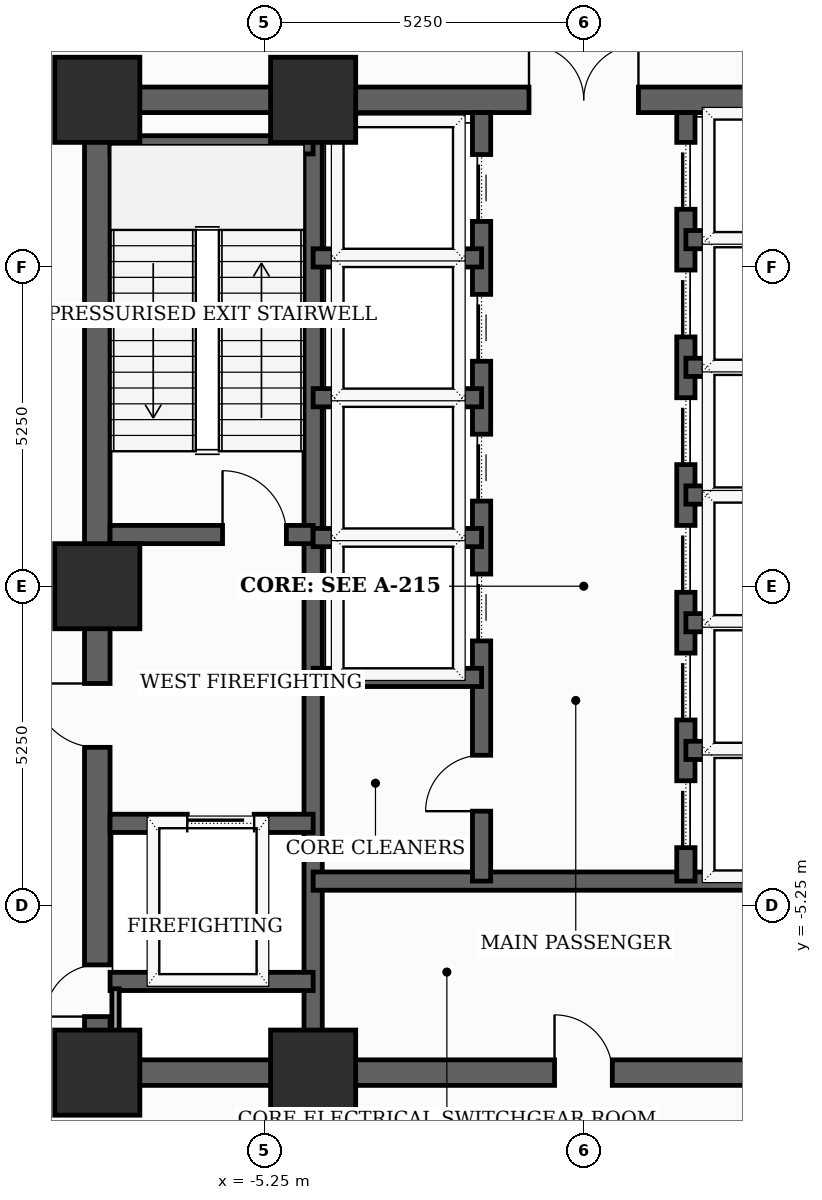
"""IFC4 building model, lengths in metres.
Left out: names, types, materials, properties, quantities, classifications, styles, units other than length and angle.
Written with IfcOpenShell. Run it as: python <this file> out.ifc"""

import sys

from ifc_helpers import new_model, si_unit, direction, frame, frame_2d, origin, origin_2d, place, context, subcontext, project, spatial, rectangle, extrude, element, fill, save


model = new_model("IFC4")
c1 = context("Model", 3, precision=1e-05, world=origin(), true_north=direction((0.0, 1.0)))
c2 = subcontext(c1, "Body", "Model", "MODEL_VIEW")
j1 = project(units=[si_unit("LENGTHUNIT", "METRE"), si_unit("PLANEANGLEUNIT", "RADIAN")], contexts=[c1])
p1 = place(None, origin())
s1 = spatial("IfcSite", under=j1, at=p1, CompositionType="ELEMENT")
p2 = place(p1, origin())
s2 = spatial("IfcBuilding", under=s1, at=p2, CompositionType="ELEMENT")
p3 = place(p2, frame((0.0, 0.0, 85.2)))
s3 = spatial("IfcBuildingStorey", under=s2, at=p3, CompositionType="ELEMENT", Elevation=85.2)
for number, where, z_axis, x_axis in (
    (1, (-8.0, -8.0, 0.0), (0.0, 0.0, 1.0), (1.0, 0.0, 0.0)),
    (2, (-4.45, -8.0, 0.0), (0.0, 0.0, 1.0), (1.0, 0.0, 0.0)),
    (3, (-4.45, 8.0, 0.0), (0.0, 0.0, 1.0), (1.0, 0.0, 0.0)),
    (4, (-8.0, 8.0, 0.0), (0.0, 0.0, 1.0), (1.0, 0.0, 0.0)),
    (5, (-8.0, 0.0, 0.0), (0.0, 0.0, 1.0), (1.0, 0.0, 0.0)),
):
    element("IfcColumn", number, at=place(p3, frame(where, z_axis=z_axis, x_axis=x_axis)), inside=s3, PredefinedType="COLUMN", context=c2, shape_type="SweptSolid", body=[
        extrude(rectangle(XDim=1.4, YDim=1.4, at=origin_2d()), origin(), (0.0, 0.0, 1.0), 5.1),
    ])
p4 = place(p3, frame((30.436, -3.14, 0.0), z_axis=(0.0, 0.0, 1.0), x_axis=(-0.743144101168, 0.669131410785, 0.0)))
e6 = element("IfcWall", 6, at=p4, inside=s3, PredefinedType="SOLIDWALL", context=c2, shape_type="SweptSolid", body=[
    extrude(rectangle(XDim=49.44, YDim=0.22, at=frame_2d((24.72, 0.0))), origin(), (0.0, 0.0, 1.0), 4.4),
])
p5 = place(p3, frame((-8.0, -8.0, 0.0), z_axis=(0.0, 0.0, 1.0), x_axis=(0.0, 1.0, 0.0)))
e7 = element("IfcWall", 7, at=p5, inside=s3, PredefinedType="SHEAR", context=c2, shape_type="SweptSolid", body=[
    extrude(rectangle(XDim=16.0, YDim=0.42, at=frame_2d((8.0, 0.0))), origin(), (0.0, 0.0, 1.0), 4.9),
])
p6 = place(p5, frame((0.922, 0.0, 0.0)))
e8 = element("IfcOpeningElement", 8, at=p6, cuts=e7, PredefinedType="OPENING", context=c2, shape_type="SweptSolid", body=[
    extrude(rectangle(XDim=0.85, YDim=2.02, at=frame_2d((0.425, 1.01))), frame((0.0, 0.22, 0.0), z_axis=(0.0, -1.0, 0.0), x_axis=(1.0, 0.0, 0.0)), (0.0, 0.0, 1.0), 0.44),
])
p7 = place(p5, frame((5.35, 0.0, 0.0)))
e9 = element("IfcOpeningElement", 9, at=p7, cuts=e7, PredefinedType="OPENING", context=c2, shape_type="SweptSolid", body=[
    extrude(rectangle(XDim=1.05, YDim=2.15, at=frame_2d((0.525, 1.075))), frame((0.0, 0.22, 0.0), z_axis=(0.0, -1.0, 0.0), x_axis=(1.0, 0.0, 0.0)), (0.0, 0.0, 1.0), 0.44),
])
p8 = place(p3, frame((-8.0, -8.0, 0.0), z_axis=(0.0, 0.0, 1.0), x_axis=(1.0, 0.0, 0.0)))
e10 = element("IfcWall", 10, at=p8, inside=s3, PredefinedType="SHEAR", context=c2, shape_type="SweptSolid", body=[
    extrude(rectangle(XDim=16.0, YDim=0.42, at=frame_2d((8.0, 0.0))), origin(), (0.0, 0.0, 1.0), 4.9),
])
p9 = place(p8, frame((7.52, 0.0, 0.0)))
e11 = element("IfcOpeningElement", 11, at=p9, cuts=e10, PredefinedType="OPENING", context=c2, shape_type="SweptSolid", body=[
    extrude(rectangle(XDim=0.95, YDim=2.1, at=frame_2d((0.475, 1.05))), frame((0.0, 0.22, 0.0), z_axis=(0.0, -1.0, 0.0), x_axis=(1.0, 0.0, 0.0)), (0.0, 0.0, 1.0), 0.44),
])
p10 = place(p3, frame((-8.0, 8.0, 0.0), z_axis=(0.0, 0.0, 1.0), x_axis=(1.0, 0.0, 0.0)))
e12 = element("IfcWall", 12, at=p10, inside=s3, PredefinedType="SHEAR", context=c2, shape_type="SweptSolid", body=[
    extrude(rectangle(XDim=16.0, YDim=0.42, at=frame_2d((8.0, 0.0))), origin(), (0.0, 0.0, 1.0), 4.9),
])
p11 = place(p10, frame((7.1, 0.0, 0.0)))
e13 = element("IfcOpeningElement", 13, at=p11, cuts=e12, PredefinedType="OPENING", context=c2, shape_type="SweptSolid", body=[
    extrude(rectangle(XDim=1.8, YDim=2.15, at=frame_2d((0.9, 1.075))), frame((0.0, 0.22, 0.0), z_axis=(0.0, -1.0, 0.0), x_axis=(1.0, 0.0, 0.0)), (0.0, 0.0, 1.0), 0.44),
])
p12 = place(p3, frame((-4.45, -7.79, 0.0), z_axis=(0.0, 0.0, 1.0), x_axis=(0.0, 1.0, 0.0)))
e14 = element("IfcWall", 14, at=p12, inside=s3, PredefinedType="SHEAR", context=c2, shape_type="SweptSolid", body=[
    extrude(rectangle(XDim=15.58, YDim=0.3, at=frame_2d((7.79, 0.0))), origin(), (0.0, 0.0, 1.0), 4.9),
])
p13 = place(p3, frame((-7.79, 0.85, 0.0), z_axis=(0.0, 0.0, 1.0), x_axis=(1.0, 0.0, 0.0)))
e15 = element("IfcWall", 15, at=p13, inside=s3, PredefinedType="SHEAR", context=c2, shape_type="SweptSolid", body=[
    extrude(rectangle(XDim=3.34, YDim=0.3, at=frame_2d((1.67, 0.0))), origin(), (0.0, 0.0, 1.0), 4.9),
])
p14 = place(p13, frame((1.85, 0.0, 0.0)))
e16 = element("IfcOpeningElement", 16, at=p14, cuts=e15, PredefinedType="OPENING", context=c2, shape_type="SweptSolid", body=[
    extrude(rectangle(XDim=1.05, YDim=2.15, at=frame_2d((0.525, 1.075))), frame((0.0, 0.16, 0.0), z_axis=(0.0, -1.0, 0.0), x_axis=(1.0, 0.0, 0.0)), (0.0, 0.0, 1.0), 0.32),
])
p15 = place(p3, frame((-7.79, 7.26, 0.0), z_axis=(0.0, 0.0, 1.0), x_axis=(1.0, 0.0, 0.0)))
e17 = element("IfcWall", 17, at=p15, inside=s3, PredefinedType="SHEAR", context=c2, shape_type="SweptSolid", body=[
    extrude(rectangle(XDim=3.34, YDim=0.3, at=frame_2d((1.67, 0.0))), origin(), (0.0, 0.0, 1.0), 4.9),
])
p16 = place(p3, frame((-7.79, -3.9, 0.0), z_axis=(0.0, 0.0, 1.0), x_axis=(1.0, 0.0, 0.0)))
e18 = element("IfcWall", 18, at=p16, inside=s3, PredefinedType="SHEAR", context=c2, shape_type="SweptSolid", body=[
    extrude(rectangle(XDim=3.34, YDim=0.3, at=frame_2d((1.67, 0.0))), origin(), (0.0, 0.0, 1.0), 4.9),
])
p17 = place(p16, frame((1.27, 0.0, 0.0)))
e19 = element("IfcOpeningElement", 19, at=p17, cuts=e18, PredefinedType="OPENING", context=c2, shape_type="SweptSolid", body=[
    extrude(rectangle(XDim=1.1, YDim=2.1, at=frame_2d((0.55, 1.05))), frame((0.0, 0.16, 0.0), z_axis=(0.0, -1.0, 0.0), x_axis=(1.0, 0.0, 0.0)), (0.0, 0.0, 1.0), 0.32),
])
p18 = place(p3, frame((-7.79, -6.5, 0.0), z_axis=(0.0, 0.0, 1.0), x_axis=(1.0, 0.0, 0.0)))
e20 = element("IfcWall", 20, at=p18, inside=s3, PredefinedType="SHEAR", context=c2, shape_type="SweptSolid", body=[
    extrude(rectangle(XDim=3.34, YDim=0.3, at=frame_2d((1.67, 0.0))), origin(), (0.0, 0.0, 1.0), 4.9),
])
p19 = place(p3, frame((-4.45, -4.85, 0.0), z_axis=(0.0, 0.0, 1.0), x_axis=(1.0, 0.0, 0.0)))
e21 = element("IfcWall", 21, at=p19, inside=s3, PredefinedType="SHEAR", context=c2, shape_type="SweptSolid", body=[
    extrude(rectangle(XDim=8.9, YDim=0.3, at=frame_2d((4.45, 0.0))), origin(), (0.0, 0.0, 1.0), 4.9),
])
p20 = place(p3, frame((-1.68, -4.85, 0.0), z_axis=(0.0, 0.0, 1.0), x_axis=(0.0, 1.0, 0.0)))
e22 = element("IfcWall", 22, at=p20, inside=s3, PredefinedType="SHEAR", context=c2, shape_type="SweptSolid", body=[
    extrude(rectangle(XDim=12.64, YDim=0.3, at=frame_2d((6.32, 0.0))), origin(), (0.0, 0.0, 1.0), 4.9),
])
p21 = place(p20, frame((3.95, 0.0, 0.0)))
e23 = element("IfcOpeningElement", 23, at=p21, cuts=e22, PredefinedType="OPENING", context=c2, shape_type="SweptSolid", body=[
    extrude(rectangle(XDim=1.1, YDim=2.1, at=frame_2d((0.55, 1.05))), frame((0.0, 0.16, 0.0), z_axis=(0.0, -1.0, 0.0), x_axis=(1.0, 0.0, 0.0)), (0.0, 0.0, 1.0), 0.32),
])
p22 = place(p20, frame((6.25, 0.0, 0.0)))
e24 = element("IfcOpeningElement", 24, at=p22, cuts=e22, PredefinedType="OPENING", context=c2, shape_type="SweptSolid", body=[
    extrude(rectangle(XDim=1.1, YDim=2.1, at=frame_2d((0.55, 1.05))), frame((0.0, 0.16, 0.0), z_axis=(0.0, -1.0, 0.0), x_axis=(1.0, 0.0, 0.0)), (0.0, 0.0, 1.0), 0.32),
])
p23 = place(p20, frame((8.55, 0.0, 0.0)))
e25 = element("IfcOpeningElement", 25, at=p23, cuts=e22, PredefinedType="OPENING", context=c2, shape_type="SweptSolid", body=[
    extrude(rectangle(XDim=1.1, YDim=2.1, at=frame_2d((0.55, 1.05))), frame((0.0, 0.16, 0.0), z_axis=(0.0, -1.0, 0.0), x_axis=(1.0, 0.0, 0.0)), (0.0, 0.0, 1.0), 0.32),
])
p24 = place(p20, frame((10.85, 0.0, 0.0)))
e26 = element("IfcOpeningElement", 26, at=p24, cuts=e22, PredefinedType="OPENING", context=c2, shape_type="SweptSolid", body=[
    extrude(rectangle(XDim=1.1, YDim=2.1, at=frame_2d((0.55, 1.05))), frame((0.0, 0.16, 0.0), z_axis=(0.0, -1.0, 0.0), x_axis=(1.0, 0.0, 0.0)), (0.0, 0.0, 1.0), 0.32),
])
p25 = place(p20, frame((1.15, 0.0, 0.0)))
e27 = element("IfcOpeningElement", 27, at=p25, cuts=e22, PredefinedType="OPENING", context=c2, shape_type="SweptSolid", body=[
    extrude(rectangle(XDim=0.92, YDim=2.1, at=frame_2d((0.46, 1.05))), frame((0.0, 0.16, 0.0), z_axis=(0.0, -1.0, 0.0), x_axis=(1.0, 0.0, 0.0)), (0.0, 0.0, 1.0), 0.32),
])
p26 = place(p3, frame((1.68, -4.85, 0.0), z_axis=(0.0, 0.0, 1.0), x_axis=(0.0, 1.0, 0.0)))
e28 = element("IfcWall", 28, at=p26, inside=s3, PredefinedType="SHEAR", context=c2, shape_type="SweptSolid", body=[
    extrude(rectangle(XDim=12.64, YDim=0.3, at=frame_2d((6.32, 0.0))), origin(), (0.0, 0.0, 1.0), 4.9),
])
p27 = place(p26, frame((0.55, 0.0, 0.0)))
e29 = element("IfcOpeningElement", 29, at=p27, cuts=e28, PredefinedType="OPENING", context=c2, shape_type="SweptSolid", body=[
    extrude(rectangle(XDim=1.1, YDim=2.1, at=frame_2d((0.55, 1.05))), frame((0.0, 0.16, 0.0), z_axis=(0.0, -1.0, 0.0), x_axis=(1.0, 0.0, 0.0)), (0.0, 0.0, 1.0), 0.32),
])
p28 = place(p26, frame((2.65, 0.0, 0.0)))
e30 = element("IfcOpeningElement", 30, at=p28, cuts=e28, PredefinedType="OPENING", context=c2, shape_type="SweptSolid", body=[
    extrude(rectangle(XDim=1.1, YDim=2.1, at=frame_2d((0.55, 1.05))), frame((0.0, 0.16, 0.0), z_axis=(0.0, -1.0, 0.0), x_axis=(1.0, 0.0, 0.0)), (0.0, 0.0, 1.0), 0.32),
])
p29 = place(p26, frame((4.75, 0.0, 0.0)))
e31 = element("IfcOpeningElement", 31, at=p29, cuts=e28, PredefinedType="OPENING", context=c2, shape_type="SweptSolid", body=[
    extrude(rectangle(XDim=1.1, YDim=2.1, at=frame_2d((0.55, 1.05))), frame((0.0, 0.16, 0.0), z_axis=(0.0, -1.0, 0.0), x_axis=(1.0, 0.0, 0.0)), (0.0, 0.0, 1.0), 0.32),
])
p30 = place(p26, frame((6.85, 0.0, 0.0)))
e32 = element("IfcOpeningElement", 32, at=p30, cuts=e28, PredefinedType="OPENING", context=c2, shape_type="SweptSolid", body=[
    extrude(rectangle(XDim=1.1, YDim=2.1, at=frame_2d((0.55, 1.05))), frame((0.0, 0.16, 0.0), z_axis=(0.0, -1.0, 0.0), x_axis=(1.0, 0.0, 0.0)), (0.0, 0.0, 1.0), 0.32),
])
p31 = place(p26, frame((8.95, 0.0, 0.0)))
e33 = element("IfcOpeningElement", 33, at=p31, cuts=e28, PredefinedType="OPENING", context=c2, shape_type="SweptSolid", body=[
    extrude(rectangle(XDim=1.1, YDim=2.1, at=frame_2d((0.55, 1.05))), frame((0.0, 0.16, 0.0), z_axis=(0.0, -1.0, 0.0), x_axis=(1.0, 0.0, 0.0)), (0.0, 0.0, 1.0), 0.32),
])
p32 = place(p26, frame((11.05, 0.0, 0.0)))
e34 = element("IfcOpeningElement", 34, at=p32, cuts=e28, PredefinedType="OPENING", context=c2, shape_type="SweptSolid", body=[
    extrude(rectangle(XDim=1.1, YDim=2.1, at=frame_2d((0.55, 1.05))), frame((0.0, 0.16, 0.0), z_axis=(0.0, -1.0, 0.0), x_axis=(1.0, 0.0, 0.0)), (0.0, 0.0, 1.0), 0.32),
])
for number, where, z_axis, x_axis in (
    (35, (-4.45, -1.5, 0.0), (0.0, 0.0, 1.0), (1.0, 0.0, 0.0)),
    (36, (-4.45, 0.8, 0.0), (0.0, 0.0, 1.0), (1.0, 0.0, 0.0)),
    (37, (-4.45, 3.1, 0.0), (0.0, 0.0, 1.0), (1.0, 0.0, 0.0)),
    (38, (-4.45, 5.4, 0.0), (0.0, 0.0, 1.0), (1.0, 0.0, 0.0)),
    (39, (1.68, 1.5, 0.0), (0.0, 0.0, 1.0), (1.0, 0.0, 0.0)),
    (40, (1.68, 3.6, 0.0), (0.0, 0.0, 1.0), (1.0, 0.0, 0.0)),
    (41, (1.68, 5.7, 0.0), (0.0, 0.0, 1.0), (1.0, 0.0, 0.0)),
    (42, (1.68, -2.7, 0.0), (0.0, 0.0, 1.0), (1.0, 0.0, 0.0)),
    (43, (1.68, -0.6, 0.0), (0.0, 0.0, 1.0), (1.0, 0.0, 0.0)),
):
    element("IfcWall", number, at=place(p3, frame(where, z_axis=z_axis, x_axis=x_axis)), inside=s3, PredefinedType="SHEAR", context=c2, shape_type="SweptSolid", body=[
        extrude(rectangle(XDim=2.77, YDim=0.3, at=frame_2d((1.385, 0.0))), origin(), (0.0, 0.0, 1.0), 4.9),
    ])
p33 = place(p3, frame((-7.036, 28.85, 0.0), z_axis=(0.0, 0.0, 1.0), x_axis=(0.743144937383, -0.669130482075, 0.0)))
e44 = element("IfcWall", 44, at=p33, inside=s3, PredefinedType="SOLIDWALL", context=c2, shape_type="SweptSolid", body=[
    extrude(rectangle(XDim=49.066, YDim=0.16, at=frame_2d((24.533, 0.0))), origin(), (0.0, 0.0, 1.0), 3.485),
])
p34 = place(p3, frame((28.503, -8.332, 0.0), z_axis=(0.0, 0.0, 1.0), x_axis=(-0.951056261584, -0.309017778296, 0.0)))
e45 = element("IfcWall", 45, at=p34, inside=s3, PredefinedType="SOLIDWALL", context=c2, shape_type="SweptSolid", body=[
    extrude(rectangle(XDim=49.066, YDim=0.16, at=frame_2d((24.533, 0.0))), origin(), (0.0, 0.0, 1.0), 3.485),
])
p35 = place(p3, frame((-7.7, -7.75, 0.0), z_axis=(0.0, 0.0, 1.0), x_axis=(0.0, 1.0, 0.0)))
e46 = element("IfcWall", 46, at=p35, inside=s3, PredefinedType="PLUMBINGWALL", context=c2, shape_type="SweptSolid", body=[
    extrude(rectangle(XDim=1.13, YDim=0.12, at=frame_2d((0.565, 0.0))), origin(), (0.0, 0.0, 1.0), 4.9),
])
p36 = place(p6, origin())
e47 = element("IfcDoor", 47, at=p36, inside=s3, OperationType="SINGLE_SWING_LEFT", PredefinedType="TRAPDOOR", context=c2, shape_type="SweptSolid", body=[
    extrude(rectangle(XDim=0.85, YDim=2.02, at=frame_2d((0.425, 1.01))), frame((0.0, 0.025, 0.0), z_axis=(0.0, -1.0, 0.0), x_axis=(1.0, 0.0, 0.0)), (0.0, 0.0, 1.0), 0.05),
])
fill(e8, e47)
p37 = place(p7, origin())
e48 = element("IfcDoor", 48, at=p37, inside=s3, OperationType="SINGLE_SWING_RIGHT", PredefinedType="DOOR", context=c2, shape_type="SweptSolid", body=[
    extrude(rectangle(XDim=1.05, YDim=2.15, at=frame_2d((0.525, 1.075))), frame((0.0, 0.025, 0.0), z_axis=(0.0, -1.0, 0.0), x_axis=(1.0, 0.0, 0.0)), (0.0, 0.0, 1.0), 0.05),
])
fill(e9, e48)
p38 = place(p9, origin())
e49 = element("IfcDoor", 49, at=p38, inside=s3, OperationType="SINGLE_SWING_LEFT", PredefinedType="DOOR", context=c2, shape_type="SweptSolid", body=[
    extrude(rectangle(XDim=0.95, YDim=2.1, at=frame_2d((0.475, 1.05))), frame((0.0, 0.025, 0.0), z_axis=(0.0, -1.0, 0.0), x_axis=(1.0, 0.0, 0.0)), (0.0, 0.0, 1.0), 0.05),
])
fill(e11, e49)
p39 = place(p11, origin())
e50 = element("IfcDoor", 50, at=p39, inside=s3, OperationType="DOUBLE_DOOR_SINGLE_SWING", PredefinedType="DOOR", context=c2, shape_type="SweptSolid", body=[
    extrude(rectangle(XDim=1.8, YDim=2.15, at=frame_2d((0.9, 1.075))), frame((0.0, 0.025, 0.0), z_axis=(0.0, -1.0, 0.0), x_axis=(1.0, 0.0, 0.0)), (0.0, 0.0, 1.0), 0.05),
])
fill(e13, e50)
p40 = place(p14, origin())
e51 = element("IfcDoor", 51, at=p40, inside=s3, OperationType="SINGLE_SWING_LEFT", PredefinedType="DOOR", context=c2, shape_type="SweptSolid", body=[
    extrude(rectangle(XDim=1.05, YDim=2.15, at=frame_2d((0.525, 1.075))), frame((0.0, 0.025, 0.0), z_axis=(0.0, -1.0, 0.0), x_axis=(1.0, 0.0, 0.0)), (0.0, 0.0, 1.0), 0.05),
])
fill(e16, e51)
p41 = place(p17, origin())
e52 = element("IfcDoor", 52, at=p41, inside=s3, OperationType="SLIDING_TO_LEFT", PredefinedType="DOOR", context=c2, shape_type="SweptSolid", body=[
    extrude(rectangle(XDim=1.1, YDim=2.1, at=frame_2d((0.55, 1.05))), frame((0.0, 0.025, 0.0), z_axis=(0.0, -1.0, 0.0), x_axis=(1.0, 0.0, 0.0)), (0.0, 0.0, 1.0), 0.05),
])
fill(e19, e52)
p42 = place(p21, origin())
e53 = element("IfcDoor", 53, at=p42, inside=s3, OperationType="SLIDING_TO_LEFT", PredefinedType="DOOR", context=c2, shape_type="SweptSolid", body=[
    extrude(rectangle(XDim=1.1, YDim=2.1, at=frame_2d((0.55, 1.05))), frame((0.0, 0.025, 0.0), z_axis=(0.0, -1.0, 0.0), x_axis=(1.0, 0.0, 0.0)), (0.0, 0.0, 1.0), 0.05),
])
fill(e23, e53)
p43 = place(p22, origin())
e54 = element("IfcDoor", 54, at=p43, inside=s3, OperationType="SLIDING_TO_LEFT", PredefinedType="DOOR", context=c2, shape_type="SweptSolid", body=[
    extrude(rectangle(XDim=1.1, YDim=2.1, at=frame_2d((0.55, 1.05))), frame((0.0, 0.025, 0.0), z_axis=(0.0, -1.0, 0.0), x_axis=(1.0, 0.0, 0.0)), (0.0, 0.0, 1.0), 0.05),
])
fill(e24, e54)
p44 = place(p23, origin())
e55 = element("IfcDoor", 55, at=p44, inside=s3, OperationType="SLIDING_TO_LEFT", PredefinedType="DOOR", context=c2, shape_type="SweptSolid", body=[
    extrude(rectangle(XDim=1.1, YDim=2.1, at=frame_2d((0.55, 1.05))), frame((0.0, 0.025, 0.0), z_axis=(0.0, -1.0, 0.0), x_axis=(1.0, 0.0, 0.0)), (0.0, 0.0, 1.0), 0.05),
])
fill(e25, e55)
p45 = place(p24, origin())
e56 = element("IfcDoor", 56, at=p45, inside=s3, OperationType="SLIDING_TO_LEFT", PredefinedType="DOOR", context=c2, shape_type="SweptSolid", body=[
    extrude(rectangle(XDim=1.1, YDim=2.1, at=frame_2d((0.55, 1.05))), frame((0.0, 0.025, 0.0), z_axis=(0.0, -1.0, 0.0), x_axis=(1.0, 0.0, 0.0)), (0.0, 0.0, 1.0), 0.05),
])
fill(e26, e56)
p46 = place(p25, origin())
e57 = element("IfcDoor", 57, at=p46, inside=s3, OperationType="SINGLE_SWING_LEFT", PredefinedType="DOOR", context=c2, shape_type="SweptSolid", body=[
    extrude(rectangle(XDim=0.92, YDim=2.1, at=frame_2d((0.46, 1.05))), frame((0.0, 0.025, 0.0), z_axis=(0.0, -1.0, 0.0), x_axis=(1.0, 0.0, 0.0)), (0.0, 0.0, 1.0), 0.05),
])
fill(e27, e57)
p47 = place(p27, origin())
e58 = element("IfcDoor", 58, at=p47, inside=s3, OperationType="SLIDING_TO_LEFT", PredefinedType="DOOR", context=c2, shape_type="SweptSolid", body=[
    extrude(rectangle(XDim=1.1, YDim=2.1, at=frame_2d((0.55, 1.05))), frame((0.0, 0.025, 0.0), z_axis=(0.0, -1.0, 0.0), x_axis=(1.0, 0.0, 0.0)), (0.0, 0.0, 1.0), 0.05),
])
fill(e29, e58)
p48 = place(p28, origin())
e59 = element("IfcDoor", 59, at=p48, inside=s3, OperationType="SLIDING_TO_LEFT", PredefinedType="DOOR", context=c2, shape_type="SweptSolid", body=[
    extrude(rectangle(XDim=1.1, YDim=2.1, at=frame_2d((0.55, 1.05))), frame((0.0, 0.025, 0.0), z_axis=(0.0, -1.0, 0.0), x_axis=(1.0, 0.0, 0.0)), (0.0, 0.0, 1.0), 0.05),
])
fill(e30, e59)
p49 = place(p29, origin())
e60 = element("IfcDoor", 60, at=p49, inside=s3, OperationType="SLIDING_TO_LEFT", PredefinedType="DOOR", context=c2, shape_type="SweptSolid", body=[
    extrude(rectangle(XDim=1.1, YDim=2.1, at=frame_2d((0.55, 1.05))), frame((0.0, 0.025, 0.0), z_axis=(0.0, -1.0, 0.0), x_axis=(1.0, 0.0, 0.0)), (0.0, 0.0, 1.0), 0.05),
])
fill(e31, e60)
p50 = place(p30, origin())
e61 = element("IfcDoor", 61, at=p50, inside=s3, OperationType="SLIDING_TO_LEFT", PredefinedType="DOOR", context=c2, shape_type="SweptSolid", body=[
    extrude(rectangle(XDim=1.1, YDim=2.1, at=frame_2d((0.55, 1.05))), frame((0.0, 0.025, 0.0), z_axis=(0.0, -1.0, 0.0), x_axis=(1.0, 0.0, 0.0)), (0.0, 0.0, 1.0), 0.05),
])
fill(e32, e61)
p51 = place(p31, origin())
e62 = element("IfcDoor", 62, at=p51, inside=s3, OperationType="SLIDING_TO_LEFT", PredefinedType="DOOR", context=c2, shape_type="SweptSolid", body=[
    extrude(rectangle(XDim=1.1, YDim=2.1, at=frame_2d((0.55, 1.05))), frame((0.0, 0.025, 0.0), z_axis=(0.0, -1.0, 0.0), x_axis=(1.0, 0.0, 0.0)), (0.0, 0.0, 1.0), 0.05),
])
fill(e33, e62)
p52 = place(p32, origin())
e63 = element("IfcDoor", 63, at=p52, inside=s3, OperationType="SLIDING_TO_LEFT", PredefinedType="DOOR", context=c2, shape_type="SweptSolid", body=[
    extrude(rectangle(XDim=1.1, YDim=2.1, at=frame_2d((0.55, 1.05))), frame((0.0, 0.025, 0.0), z_axis=(0.0, -1.0, 0.0), x_axis=(1.0, 0.0, 0.0)), (0.0, 0.0, 1.0), 0.05),
])
fill(e34, e63)
save(model, sys.argv[1])
